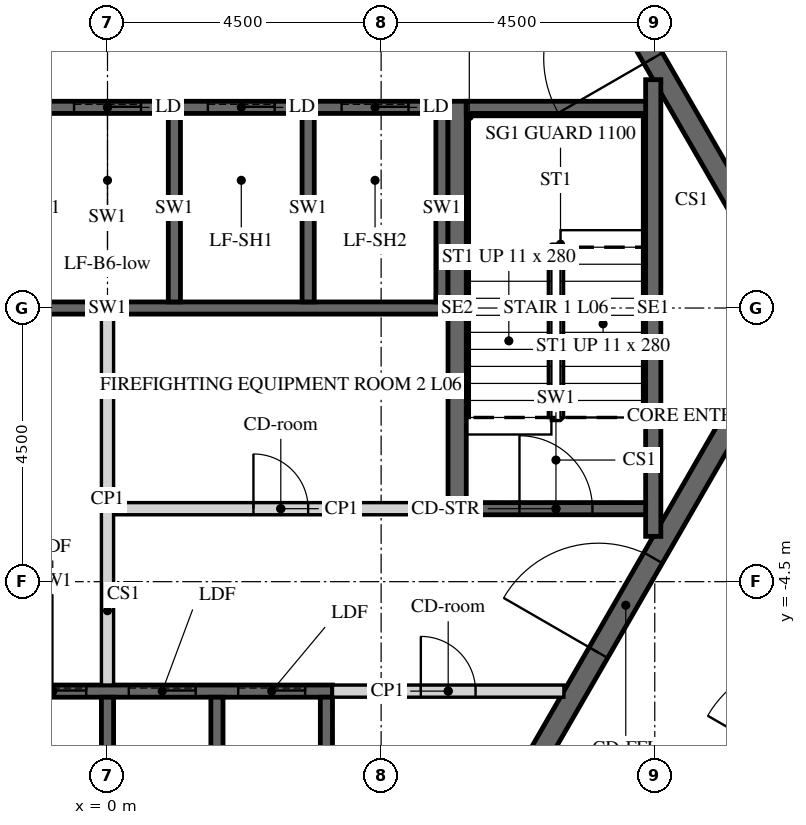
"""IFC4 building model, lengths in metres.
Left out: names, types, materials, properties, quantities, classifications, styles, units other than length and angle.
Written with IfcOpenShell. Run it as: python <this file> out.ifc"""

import sys

from ifc_helpers import new_model, si_unit, direction, frame, frame_2d, origin, place, context, subcontext, project, spatial, polyline, rectangle, outline, extrude, element, fill, save


model = new_model("IFC4")
c1 = context("Model", 3, precision=1e-05, world=origin(), true_north=direction((0.0, 1.0)))
c2 = subcontext(c1, "Body", "Model", "MODEL_VIEW")
j1 = project(units=[si_unit("LENGTHUNIT", "METRE"), si_unit("PLANEANGLEUNIT", "RADIAN")], contexts=[c1])
p1 = place(None, origin())
s1 = spatial("IfcSite", under=j1, at=p1, CompositionType="ELEMENT")
p2 = place(p1, origin())
s2 = spatial("IfcBuilding", under=s1, at=p2, CompositionType="ELEMENT")
p3 = place(p2, frame((0.0, 0.0, 37.5)))
s3 = spatial("IfcBuildingStorey", under=s2, at=p3, CompositionType="ELEMENT", Elevation=37.5)
p4 = place(p3, frame((7.91, -13.7, -0.15), z_axis=(0.0, 0.0, 1.0), x_axis=(0.499999880136, 0.866025472988, 0.0)))
e1 = element("IfcWall", 1, at=p4, inside=s3, PredefinedType="SHEAR", context=c2, shape_type="SweptSolid", body=[
    extrude(outline(polyline([(-0.173, -0.3), (15.993, -0.3), (15.646, 0.3), (0.173, 0.3), (-0.173, -0.3)])), origin(), (0.0, 0.0, 1.0), 3.9),
])
p5 = place(p4, frame((7.039, 0.0, 0.15)))
e2 = element("IfcOpeningElement", 2, at=p5, cuts=e1, PredefinedType="OPENING", context=c2, shape_type="SweptSolid", body=[
    extrude(rectangle(XDim=1.8, YDim=2.4, at=frame_2d((0.9, 1.2))), frame((0.0, 0.31, 0.0), z_axis=(0.0, -1.0, 0.0), x_axis=(1.0, 0.0, 0.0)), (0.0, 0.0, 1.0), 0.62),
])
p6 = place(p3, frame((15.819, 0.0, -0.15), z_axis=(0.0, 0.0, 1.0), x_axis=(-0.499999880136, 0.866025472988, 0.0)))
e3 = element("IfcWall", 3, at=p6, inside=s3, PredefinedType="SHEAR", context=c2, shape_type="SweptSolid", body=[
    extrude(outline(polyline([(-0.173, -0.3), (15.993, -0.3), (15.646, 0.3), (0.173, 0.3), (-0.173, -0.3)])), origin(), (0.0, 0.0, 1.0), 3.9),
])
p7 = place(p6, frame((6.981, 0.0, 0.15)))
e4 = element("IfcOpeningElement", 4, at=p7, cuts=e3, PredefinedType="OPENING", context=c2, shape_type="SweptSolid", body=[
    extrude(rectangle(XDim=1.8, YDim=2.4, at=frame_2d((0.9, 1.2))), frame((0.0, 0.31, 0.0), z_axis=(0.0, -1.0, 0.0), x_axis=(1.0, 0.0, 0.0)), (0.0, 0.0, 1.0), 0.62),
])
p8 = place(p3, frame((5.673, -9.825, -0.15), z_axis=(0.0, 0.0, 1.0), x_axis=(0.499995046907, 0.866028263435, 0.0)))
e5 = element("IfcWall", 5, at=p8, inside=s3, PredefinedType="SHEAR", context=c2, shape_type="SweptSolid", body=[
    extrude(outline(polyline([(-0.101, -0.175), (11.446, -0.175), (11.244, 0.175), (0.101, 0.175), (-0.101, -0.175)])), origin(), (0.0, 0.0, 1.0), 3.9),
])
p9 = place(p8, frame((4.801, 0.0, 0.15)))
e6 = element("IfcOpeningElement", 6, at=p9, cuts=e5, PredefinedType="OPENING", context=c2, shape_type="SweptSolid", body=[
    extrude(rectangle(XDim=1.8, YDim=2.4, at=frame_2d((0.9, 1.2))), frame((0.0, 0.185, 0.0), z_axis=(0.0, -1.0, 0.0), x_axis=(1.0, 0.0, 0.0)), (0.0, 0.0, 1.0), 0.37),
])
p10 = place(p3, frame((11.345, 0.0, -0.15), z_axis=(0.0, 0.0, 1.0), x_axis=(-0.499995046907, 0.866028263435, 0.0)))
e7 = element("IfcWall", 7, at=p10, inside=s3, PredefinedType="SHEAR", context=c2, shape_type="SweptSolid", body=[
    extrude(outline(polyline([(-0.101, -0.175), (11.446, -0.175), (11.244, 0.175), (0.101, 0.175), (-0.101, -0.175)])), origin(), (0.0, 0.0, 1.0), 3.9),
])
p11 = place(p10, frame((4.744, 0.0, 0.15)))
e8 = element("IfcOpeningElement", 8, at=p11, cuts=e7, PredefinedType="OPENING", context=c2, shape_type="SweptSolid", body=[
    extrude(rectangle(XDim=1.8, YDim=2.4, at=frame_2d((0.9, 1.2))), frame((0.0, 0.185, 0.0), z_axis=(0.0, -1.0, 0.0), x_axis=(1.0, 0.0, 0.0)), (0.0, 0.0, 1.0), 0.37),
])
p12 = place(p3, frame((-5.6, 3.3, -0.25), z_axis=(0.0, 0.0, 1.0), x_axis=(1.0, 0.0, 0.0)))
e9 = element("IfcWall", 9, at=p12, inside=s3, PredefinedType="SHEAR", context=c2, shape_type="SweptSolid", body=[
    extrude(rectangle(XDim=11.2, YDim=0.2, at=frame_2d((5.6, 0.0))), origin(), (0.0, 0.0, 1.0), 3.9),
])
p13 = place(p12, frame((0.65, 0.0, 0.25)))
e10 = element("IfcOpeningElement", 10, at=p13, cuts=e9, PredefinedType="OPENING", context=c2, shape_type="SweptSolid", body=[
    extrude(rectangle(XDim=1.1, YDim=2.1, at=frame_2d((0.55, 1.05))), frame((0.0, 0.11, 0.0), z_axis=(0.0, -1.0, 0.0), x_axis=(1.0, 0.0, 0.0)), (0.0, 0.0, 1.0), 0.22),
])
p14 = place(p12, frame((2.85, 0.0, 0.25)))
e11 = element("IfcOpeningElement", 11, at=p14, cuts=e9, PredefinedType="OPENING", context=c2, shape_type="SweptSolid", body=[
    extrude(rectangle(XDim=1.1, YDim=2.1, at=frame_2d((0.55, 1.05))), frame((0.0, 0.11, 0.0), z_axis=(0.0, -1.0, 0.0), x_axis=(1.0, 0.0, 0.0)), (0.0, 0.0, 1.0), 0.22),
])
p15 = place(p12, frame((5.05, 0.0, 0.25)))
e12 = element("IfcOpeningElement", 12, at=p15, cuts=e9, PredefinedType="OPENING", context=c2, shape_type="SweptSolid", body=[
    extrude(rectangle(XDim=1.1, YDim=2.1, at=frame_2d((0.55, 1.05))), frame((0.0, 0.11, 0.0), z_axis=(0.0, -1.0, 0.0), x_axis=(1.0, 0.0, 0.0)), (0.0, 0.0, 1.0), 0.22),
])
p16 = place(p12, frame((7.25, 0.0, 0.25)))
e13 = element("IfcOpeningElement", 13, at=p16, cuts=e9, PredefinedType="OPENING", context=c2, shape_type="SweptSolid", body=[
    extrude(rectangle(XDim=1.1, YDim=2.1, at=frame_2d((0.55, 1.05))), frame((0.0, 0.11, 0.0), z_axis=(0.0, -1.0, 0.0), x_axis=(1.0, 0.0, 0.0)), (0.0, 0.0, 1.0), 0.22),
])
p17 = place(p12, frame((9.45, 0.0, 0.25)))
e14 = element("IfcOpeningElement", 14, at=p17, cuts=e9, PredefinedType="OPENING", context=c2, shape_type="SweptSolid", body=[
    extrude(rectangle(XDim=1.1, YDim=2.1, at=frame_2d((0.55, 1.05))), frame((0.0, 0.11, 0.0), z_axis=(0.0, -1.0, 0.0), x_axis=(1.0, 0.0, 0.0)), (0.0, 0.0, 1.0), 0.22),
])
p18 = place(p3, frame((-5.6, 0.0, -0.25), z_axis=(0.0, 0.0, 1.0), x_axis=(1.0, 0.0, 0.0)))
e15 = element("IfcWall", 15, at=p18, inside=s3, PredefinedType="SHEAR", context=c2, shape_type="SweptSolid", body=[
    extrude(rectangle(XDim=11.2, YDim=0.2, at=frame_2d((5.6, 0.0))), origin(), (0.0, 0.0, 1.0), 3.9),
])
for number, where, z_axis, x_axis in (
    (16, (1.1, 0.1, -0.25), (0.0, 0.0, 1.0), (0.0, 1.0, 0.0)),
    (17, (3.3, 0.1, -0.25), (0.0, 0.0, 1.0), (0.0, 1.0, 0.0)),
    (18, (5.5, 0.1, -0.25), (0.0, 0.0, 1.0), (0.0, 1.0, 0.0)),
):
    element("IfcWall", number, at=place(p3, frame(where, z_axis=z_axis, x_axis=x_axis)), inside=s3, PredefinedType="SHEAR", context=c2, shape_type="SweptSolid", body=[
        extrude(rectangle(XDim=3.1, YDim=0.2, at=frame_2d((1.55, 0.0))), origin(), (0.0, 0.0, 1.0), 3.9),
    ])
p19 = place(p3, frame((-5.5, -6.3, -0.25), z_axis=(0.0, 0.0, 1.0), x_axis=(1.0, 0.0, 0.0)))
e19 = element("IfcWall", 19, at=p19, inside=s3, PredefinedType="SHEAR", context=c2, shape_type="SweptSolid", body=[
    extrude(rectangle(XDim=9.2, YDim=0.2, at=frame_2d((4.6, 0.0))), origin(), (0.0, 0.0, 1.0), 3.9),
])
p20 = place(p19, frame((0.45, 0.0, 0.25)))
e20 = element("IfcOpeningElement", 20, at=p20, cuts=e19, PredefinedType="OPENING", context=c2, shape_type="SweptSolid", body=[
    extrude(rectangle(XDim=1.1, YDim=2.1, at=frame_2d((0.55, 1.05))), frame((0.0, 0.11, 0.0), z_axis=(0.0, -1.0, 0.0), x_axis=(1.0, 0.0, 0.0)), (0.0, 0.0, 1.0), 0.22),
])
p21 = place(p19, frame((2.25, 0.0, 0.25)))
e21 = element("IfcOpeningElement", 21, at=p21, cuts=e19, PredefinedType="OPENING", context=c2, shape_type="SweptSolid", body=[
    extrude(rectangle(XDim=1.1, YDim=2.1, at=frame_2d((0.55, 1.05))), frame((0.0, 0.11, 0.0), z_axis=(0.0, -1.0, 0.0), x_axis=(1.0, 0.0, 0.0)), (0.0, 0.0, 1.0), 0.22),
])
p22 = place(p19, frame((4.05, 0.0, 0.25)))
e22 = element("IfcOpeningElement", 22, at=p22, cuts=e19, PredefinedType="OPENING", context=c2, shape_type="SweptSolid", body=[
    extrude(rectangle(XDim=1.1, YDim=2.1, at=frame_2d((0.55, 1.05))), frame((0.0, 0.11, 0.0), z_axis=(0.0, -1.0, 0.0), x_axis=(1.0, 0.0, 0.0)), (0.0, 0.0, 1.0), 0.22),
])
p23 = place(p19, frame((5.85, 0.0, 0.25)))
e23 = element("IfcOpeningElement", 23, at=p23, cuts=e19, PredefinedType="OPENING", context=c2, shape_type="SweptSolid", body=[
    extrude(rectangle(XDim=1.1, YDim=2.1, at=frame_2d((0.55, 1.05))), frame((0.0, 0.11, 0.0), z_axis=(0.0, -1.0, 0.0), x_axis=(1.0, 0.0, 0.0)), (0.0, 0.0, 1.0), 0.22),
])
p24 = place(p19, frame((7.65, 0.0, 0.25)))
e24 = element("IfcOpeningElement", 24, at=p24, cuts=e19, PredefinedType="OPENING", context=c2, shape_type="SweptSolid", body=[
    extrude(rectangle(XDim=1.1, YDim=2.1, at=frame_2d((0.55, 1.05))), frame((0.0, 0.11, 0.0), z_axis=(0.0, -1.0, 0.0), x_axis=(1.0, 0.0, 0.0)), (0.0, 0.0, 1.0), 0.22),
])
for number, where, z_axis, x_axis in (
    (25, (0.0, -9.3, -0.25), (0.0, 0.0, 1.0), (0.0, 1.0, 0.0)),
    (26, (1.8, -9.3, -0.25), (0.0, 0.0, 1.0), (0.0, 1.0, 0.0)),
    (27, (3.6, -9.3, -0.25), (0.0, 0.0, 1.0), (0.0, 1.0, 0.0)),
):
    element("IfcWall", number, at=place(p3, frame(where, z_axis=z_axis, x_axis=x_axis)), inside=s3, PredefinedType="SHEAR", context=c2, shape_type="SweptSolid", body=[
        extrude(rectangle(XDim=2.9, YDim=0.2, at=frame_2d((1.45, 0.0))), origin(), (0.0, 0.0, 1.0), 3.9),
    ])
p25 = place(p3, frame((0.1, -3.3, 0.0), z_axis=(0.0, 0.0, 1.0), x_axis=(1.0, 0.0, 0.0)))
e28 = element("IfcWall", 28, at=p25, inside=s3, PredefinedType="PARTITIONING", context=c2, shape_type="SweptSolid", body=[
    extrude(rectangle(XDim=5.5, YDim=0.2, at=frame_2d((2.75, 0.0))), origin(), (0.0, 0.0, 1.0), 3.65),
])
p26 = place(p25, frame((2.3, 0.0, 0.0)))
e29 = element("IfcOpeningElement", 29, at=p26, cuts=e28, PredefinedType="OPENING", context=c2, shape_type="SweptSolid", body=[
    extrude(rectangle(XDim=0.9, YDim=2.1, at=frame_2d((0.45, 1.05))), frame((0.0, 0.11, 0.0), z_axis=(0.0, -1.0, 0.0), x_axis=(1.0, 0.0, 0.0)), (0.0, 0.0, 1.0), 0.22),
])
p27 = place(p3, frame((0.0, -6.2, 0.0), z_axis=(0.0, 0.0, 1.0), x_axis=(0.0, 1.0, 0.0)))
e30 = element("IfcWall", 30, at=p27, inside=s3, PredefinedType="PARTITIONING", context=c2, shape_type="SweptSolid", body=[
    extrude(rectangle(XDim=6.1, YDim=0.2, at=frame_2d((3.05, 0.0))), origin(), (0.0, 0.0, 1.0), 3.65),
])
p28 = place(p3, frame((3.7, -6.3, 0.0), z_axis=(0.0, 0.0, 1.0), x_axis=(1.0, 0.0, 0.0)))
e31 = element("IfcWall", 31, at=p28, inside=s3, PredefinedType="PARTITIONING", context=c2, shape_type="SweptSolid", body=[
    extrude(rectangle(XDim=3.806, YDim=0.2, at=frame_2d((1.903, 0.0))), origin(), (0.0, 0.0, 1.0), 3.65),
])
p29 = place(p28, frame((1.453, 0.0, 0.0)))
e32 = element("IfcOpeningElement", 32, at=p29, cuts=e31, PredefinedType="OPENING", context=c2, shape_type="SweptSolid", body=[
    extrude(rectangle(XDim=0.9, YDim=2.1, at=frame_2d((0.45, 1.05))), frame((0.0, 0.11, 0.0), z_axis=(0.0, -1.0, 0.0), x_axis=(1.0, 0.0, 0.0)), (0.0, 0.0, 1.0), 0.22),
])
p30 = place(p3, frame((5.75, -3.4, -0.25), z_axis=(0.0, 0.0, 1.0), x_axis=(0.0, 1.0, 0.0)))
e33 = element("IfcWall", 33, at=p30, inside=s3, PredefinedType="SHEAR", context=c2, shape_type="SweptSolid", body=[
    extrude(rectangle(XDim=6.8, YDim=0.3, at=frame_2d((3.4, 0.0))), origin(), (0.0, 0.0, 1.0), 3.9),
])
p31 = place(p3, frame((8.975, -3.755, -0.25), z_axis=(0.0, 0.0, 1.0), x_axis=(0.0, 1.0, 0.0)))
e34 = element("IfcWall", 34, at=p31, inside=s3, PredefinedType="SHEAR", context=c2, shape_type="SweptSolid", body=[
    extrude(rectangle(XDim=7.51, YDim=0.25, at=frame_2d((3.755, 0.0))), origin(), (0.0, 0.0, 1.0), 3.9),
])
p32 = place(p3, frame((5.9, 3.3, -0.25), z_axis=(0.0, 0.0, 1.0), x_axis=(1.0, 0.0, 0.0)))
e35 = element("IfcWall", 35, at=p32, inside=s3, PredefinedType="SHEAR", context=c2, shape_type="SweptSolid", body=[
    extrude(rectangle(XDim=2.95, YDim=0.2, at=frame_2d((1.475, 0.0))), origin(), (0.0, 0.0, 1.0), 3.9),
])
p33 = place(p3, frame((5.9, -3.3, -0.25), z_axis=(0.0, 0.0, 1.0), x_axis=(1.0, 0.0, 0.0)))
e36 = element("IfcWall", 36, at=p33, inside=s3, PredefinedType="SHEAR", context=c2, shape_type="SweptSolid", body=[
    extrude(rectangle(XDim=2.95, YDim=0.2, at=frame_2d((1.475, 0.0))), origin(), (0.0, 0.0, 1.0), 3.9),
])
p34 = place(p33, frame((0.875, 0.0, 0.25)))
e37 = element("IfcOpeningElement", 37, at=p34, cuts=e36, PredefinedType="OPENING", context=c2, shape_type="SweptSolid", body=[
    extrude(rectangle(XDim=1.2, YDim=2.4, at=frame_2d((0.6, 1.2))), frame((0.0, 0.11, 0.0), z_axis=(0.0, -1.0, 0.0), x_axis=(1.0, 0.0, 0.0)), (0.0, 0.0, 1.0), 0.22),
])
p35 = place(p11, origin())
e38 = element("IfcDoor", 38, at=p35, inside=s3, OperationType="DOUBLE_DOOR_SINGLE_SWING", PredefinedType="DOOR", context=c2, shape_type="SweptSolid", body=[
    extrude(rectangle(XDim=1.8, YDim=2.4, at=frame_2d((0.9, 1.2))), frame((0.0, 0.025, 0.0), z_axis=(0.0, -1.0, 0.0), x_axis=(1.0, 0.0, 0.0)), (0.0, 0.0, 1.0), 0.05),
])
fill(e8, e38)
p36 = place(p9, origin())
e39 = element("IfcDoor", 39, at=p36, inside=s3, OperationType="DOUBLE_DOOR_SINGLE_SWING", PredefinedType="DOOR", context=c2, shape_type="SweptSolid", body=[
    extrude(rectangle(XDim=1.8, YDim=2.4, at=frame_2d((0.9, 1.2))), frame((0.0, 0.025, 0.0), z_axis=(0.0, -1.0, 0.0), x_axis=(1.0, 0.0, 0.0)), (0.0, 0.0, 1.0), 0.05),
])
fill(e6, e39)
p37 = place(p26, origin())
e40 = element("IfcDoor", 40, at=p37, inside=s3, OperationType="SINGLE_SWING_LEFT", PredefinedType="DOOR", context=c2, shape_type="SweptSolid", body=[
    extrude(rectangle(XDim=0.9, YDim=2.1, at=frame_2d((0.45, 1.05))), frame((0.0, 0.025, 0.0), z_axis=(0.0, -1.0, 0.0), x_axis=(1.0, 0.0, 0.0)), (0.0, 0.0, 1.0), 0.05),
])
fill(e29, e40)
p38 = place(p29, origin())
e41 = element("IfcDoor", 41, at=p38, inside=s3, OperationType="SINGLE_SWING_LEFT", PredefinedType="DOOR", context=c2, shape_type="SweptSolid", body=[
    extrude(rectangle(XDim=0.9, YDim=2.1, at=frame_2d((0.45, 1.05))), frame((0.0, 0.025, 0.0), z_axis=(0.0, -1.0, 0.0), x_axis=(1.0, 0.0, 0.0)), (0.0, 0.0, 1.0), 0.05),
])
fill(e32, e41)
p39 = place(p34, origin())
e42 = element("IfcDoor", 42, at=p39, inside=s3, OperationType="SINGLE_SWING_LEFT", PredefinedType="DOOR", context=c2, shape_type="SweptSolid", body=[
    extrude(rectangle(XDim=1.2, YDim=2.4, at=frame_2d((0.6, 1.2))), frame((0.0, 0.025, 0.0), z_axis=(0.0, -1.0, 0.0), x_axis=(1.0, 0.0, 0.0)), (0.0, 0.0, 1.0), 0.05),
])
fill(e37, e42)
p40 = place(p15, origin())
e43 = element("IfcDoor", 43, at=p40, inside=s3, OperationType="SLIDING_TO_LEFT", PredefinedType="DOOR", context=c2, shape_type="SweptSolid", body=[
    extrude(rectangle(XDim=1.1, YDim=2.1, at=frame_2d((0.55, 1.05))), frame((0.0, 0.025, 0.0), z_axis=(0.0, -1.0, 0.0), x_axis=(1.0, 0.0, 0.0)), (0.0, 0.0, 1.0), 0.05),
])
fill(e12, e43)
p41 = place(p16, origin())
e44 = element("IfcDoor", 44, at=p41, inside=s3, OperationType="SLIDING_TO_LEFT", PredefinedType="DOOR", context=c2, shape_type="SweptSolid", body=[
    extrude(rectangle(XDim=1.1, YDim=2.1, at=frame_2d((0.55, 1.05))), frame((0.0, 0.025, 0.0), z_axis=(0.0, -1.0, 0.0), x_axis=(1.0, 0.0, 0.0)), (0.0, 0.0, 1.0), 0.05),
])
fill(e13, e44)
p42 = place(p17, origin())
e45 = element("IfcDoor", 45, at=p42, inside=s3, OperationType="SLIDING_TO_LEFT", PredefinedType="DOOR", context=c2, shape_type="SweptSolid", body=[
    extrude(rectangle(XDim=1.1, YDim=2.1, at=frame_2d((0.55, 1.05))), frame((0.0, 0.025, 0.0), z_axis=(0.0, -1.0, 0.0), x_axis=(1.0, 0.0, 0.0)), (0.0, 0.0, 1.0), 0.05),
])
fill(e14, e45)
p43 = place(p22, origin())
e46 = element("IfcDoor", 46, at=p43, inside=s3, OperationType="SLIDING_TO_LEFT", PredefinedType="DOOR", context=c2, shape_type="SweptSolid", body=[
    extrude(rectangle(XDim=1.1, YDim=2.1, at=frame_2d((0.55, 1.05))), frame((0.0, 0.025, 0.0), z_axis=(0.0, -1.0, 0.0), x_axis=(1.0, 0.0, 0.0)), (0.0, 0.0, 1.0), 0.05),
])
fill(e22, e46)
p44 = place(p23, origin())
e47 = element("IfcDoor", 47, at=p44, inside=s3, OperationType="SLIDING_TO_LEFT", PredefinedType="DOOR", context=c2, shape_type="SweptSolid", body=[
    extrude(rectangle(XDim=1.1, YDim=2.1, at=frame_2d((0.55, 1.05))), frame((0.0, 0.025, 0.0), z_axis=(0.0, -1.0, 0.0), x_axis=(1.0, 0.0, 0.0)), (0.0, 0.0, 1.0), 0.05),
])
fill(e23, e47)
p45 = place(p24, origin())
e48 = element("IfcDoor", 48, at=p45, inside=s3, OperationType="SLIDING_TO_LEFT", PredefinedType="DOOR", context=c2, shape_type="SweptSolid", body=[
    extrude(rectangle(XDim=1.1, YDim=2.1, at=frame_2d((0.55, 1.05))), frame((0.0, 0.025, 0.0), z_axis=(0.0, -1.0, 0.0), x_axis=(1.0, 0.0, 0.0)), (0.0, 0.0, 1.0), 0.05),
])
fill(e24, e48)
save(model, sys.argv[1])
